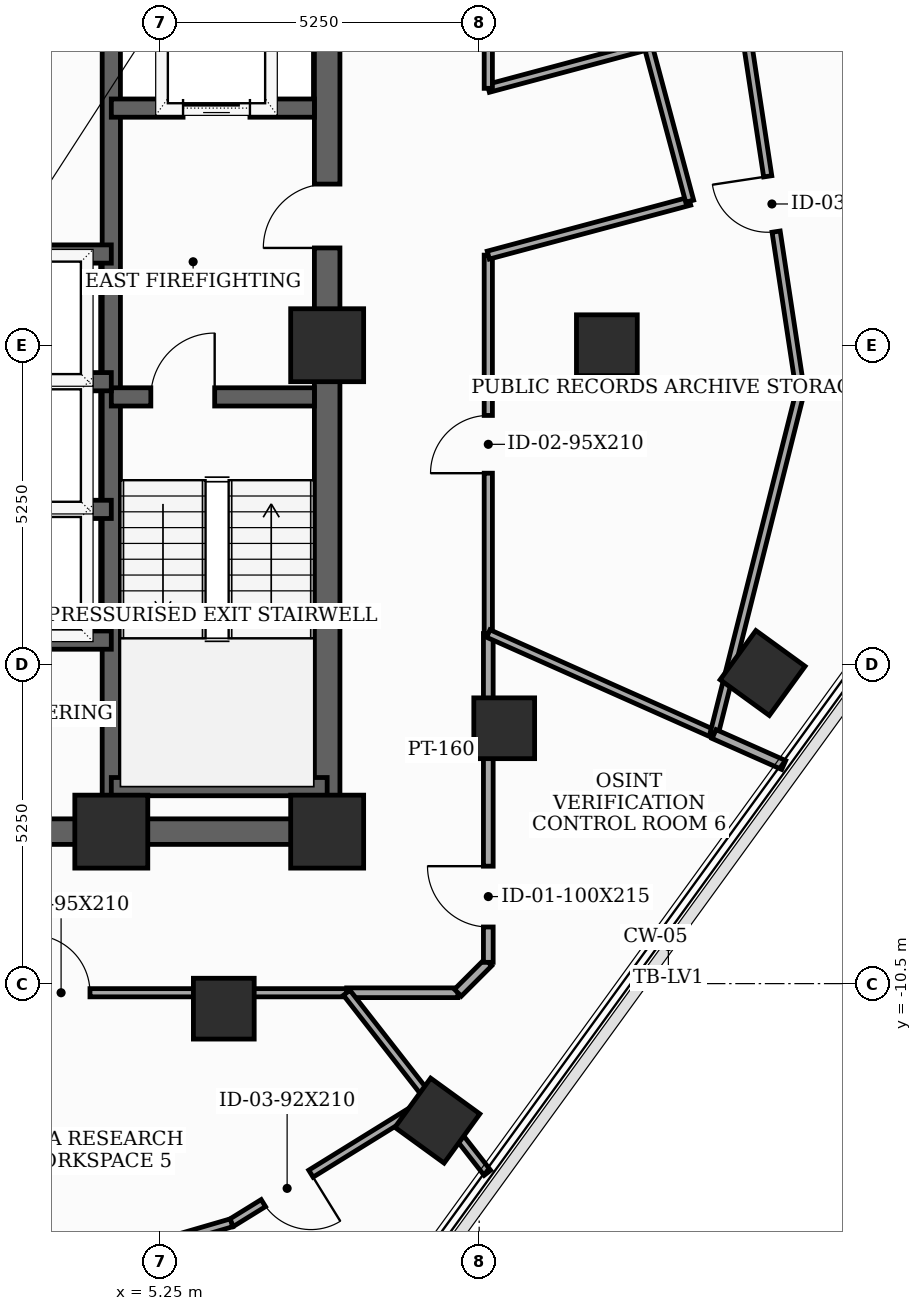
"""IFC4 building model, lengths in metres.
Left out: names, types, materials, properties, quantities, classifications, styles, units other than length and angle.
Written with IfcOpenShell. Run it as: python <this file> out.ifc"""

import sys

from ifc_helpers import new_model, si_unit, direction, frame, frame_2d, origin, origin_2d, place, context, subcontext, project, spatial, rectangle, extrude, element, fill, save


model = new_model("IFC4")
c1 = context("Model", 3, precision=1e-05, world=origin(), true_north=direction((0.0, 1.0)))
c2 = subcontext(c1, "Body", "Model", "MODEL_VIEW")
j1 = project(units=[si_unit("LENGTHUNIT", "METRE"), si_unit("PLANEANGLEUNIT", "RADIAN")], contexts=[c1])
p1 = place(None, origin())
s1 = spatial("IfcSite", under=j1, at=p1, CompositionType="ELEMENT")
p2 = place(p1, origin())
s2 = spatial("IfcBuilding", under=s1, at=p2, CompositionType="ELEMENT")
p3 = place(p2, frame((0.0, 0.0, 237.4)))
s3 = spatial("IfcBuildingStorey", under=s2, at=p3, CompositionType="ELEMENT", Elevation=237.4)
for number, where, z_axis, x_axis in (
    (1, (4.45, -8.0, 0.0), (0.0, 0.0, 1.0), (1.0, 0.0, 0.0)),
    (2, (8.0, -8.0, 0.0), (0.0, 0.0, 1.0), (1.0, 0.0, 0.0)),
    (3, (8.0, 0.0, 0.0), (0.0, 0.0, 1.0), (1.0, 0.0, 0.0)),
):
    element("IfcColumn", number, at=place(p3, frame(where, z_axis=z_axis, x_axis=x_axis)), inside=s3, PredefinedType="COLUMN", context=c2, shape_type="SweptSolid", body=[
        extrude(rectangle(XDim=1.2, YDim=1.2, at=origin_2d()), origin(), (0.0, 0.0, 1.0), 3.7),
    ])
for number, where, z_axis, x_axis in (
    (4, (12.6, 0.0, 0.0), (0.0, 0.0, 1.0), (1.0, 0.0, 0.0)),
    (5, (6.3, -10.912, 0.0), (0.0, 0.0, 1.0), (1.0, 0.0, 0.0)),
    (6, (10.912, -6.3, 0.0), (0.0, 0.0, 1.0), (1.0, 0.0, 0.0)),
    (7, (9.812, -12.753, 0.0), (0.0, 0.0, 1.0), (0.588, 0.809, 0.0)),
    (8, (15.161, -5.391, 0.0), (0.0, 0.0, 1.0), (0.588, 0.809, 0.0)),
):
    element("IfcColumn", number, at=place(p3, frame(where, z_axis=z_axis, x_axis=x_axis)), inside=s3, PredefinedType="COLUMN", context=c2, shape_type="SweptSolid", body=[
        extrude(rectangle(XDim=1.0, YDim=1.0, at=origin_2d()), origin(), (0.0, 0.0, 1.0), 3.7),
    ])
p4 = place(p3, frame((8.0, -8.0, 0.0), z_axis=(0.0, 0.0, 1.0), x_axis=(0.0, 1.0, 0.0)))
e9 = element("IfcWall", 9, at=p4, inside=s3, PredefinedType="SHEAR", context=c2, shape_type="SweptSolid", body=[
    extrude(rectangle(XDim=16.0, YDim=0.42, at=frame_2d((8.0, 0.0))), origin(), (0.0, 0.0, 1.0), 3.5),
])
p5 = place(p4, frame((9.6, 0.0, 0.0)))
e10 = element("IfcOpeningElement", 10, at=p5, cuts=e9, PredefinedType="OPENING", context=c2, shape_type="SweptSolid", body=[
    extrude(rectangle(XDim=1.05, YDim=2.15, at=frame_2d((0.525, 1.075))), frame((0.0, 0.22, 0.0), z_axis=(0.0, -1.0, 0.0), x_axis=(1.0, 0.0, 0.0)), (0.0, 0.0, 1.0), 0.44),
])
p6 = place(p4, frame((14.389, 0.0, 0.0)))
e11 = element("IfcOpeningElement", 11, at=p6, cuts=e9, PredefinedType="OPENING", context=c2, shape_type="SweptSolid", body=[
    extrude(rectangle(XDim=0.85, YDim=2.02, at=frame_2d((0.425, 1.01))), frame((0.0, 0.22, 0.0), z_axis=(0.0, -1.0, 0.0), x_axis=(1.0, 0.0, 0.0)), (0.0, 0.0, 1.0), 0.44),
])
p7 = place(p3, frame((-8.0, -8.0, 0.0), z_axis=(0.0, 0.0, 1.0), x_axis=(1.0, 0.0, 0.0)))
e12 = element("IfcWall", 12, at=p7, inside=s3, PredefinedType="SHEAR", context=c2, shape_type="SweptSolid", body=[
    extrude(rectangle(XDim=16.0, YDim=0.42, at=frame_2d((8.0, 0.0))), origin(), (0.0, 0.0, 1.0), 3.5),
])
p8 = place(p7, frame((4.6, 0.0, 0.0)))
e13 = element("IfcOpeningElement", 13, at=p8, cuts=e12, PredefinedType="OPENING", context=c2, shape_type="SweptSolid", body=[
    extrude(rectangle(XDim=0.95, YDim=2.1, at=frame_2d((0.475, 1.05))), frame((0.0, 0.22, 0.0), z_axis=(0.0, -1.0, 0.0), x_axis=(1.0, 0.0, 0.0)), (0.0, 0.0, 1.0), 0.44),
])
p9 = place(p7, frame((7.52, 0.0, 0.0)))
e14 = element("IfcOpeningElement", 14, at=p9, cuts=e12, PredefinedType="OPENING", context=c2, shape_type="SweptSolid", body=[
    extrude(rectangle(XDim=0.95, YDim=2.1, at=frame_2d((0.475, 1.05))), frame((0.0, 0.22, 0.0), z_axis=(0.0, -1.0, 0.0), x_axis=(1.0, 0.0, 0.0)), (0.0, 0.0, 1.0), 0.44),
])
p10 = place(p7, frame((10.45, 0.0, 0.0)))
e15 = element("IfcOpeningElement", 15, at=p10, cuts=e12, PredefinedType="OPENING", context=c2, shape_type="SweptSolid", body=[
    extrude(rectangle(XDim=0.95, YDim=2.1, at=frame_2d((0.475, 1.05))), frame((0.0, 0.22, 0.0), z_axis=(0.0, -1.0, 0.0), x_axis=(1.0, 0.0, 0.0)), (0.0, 0.0, 1.0), 0.44),
])
p11 = place(p3, frame((4.45, -7.79, 0.0), z_axis=(0.0, 0.0, 1.0), x_axis=(0.0, 1.0, 0.0)))
e16 = element("IfcWall", 16, at=p11, inside=s3, PredefinedType="SHEAR", context=c2, shape_type="SweptSolid", body=[
    extrude(rectangle(XDim=15.58, YDim=0.3, at=frame_2d((7.79, 0.0))), origin(), (0.0, 0.0, 1.0), 3.5),
])
p12 = place(p3, frame((4.45, -0.85, 0.0), z_axis=(0.0, 0.0, 1.0), x_axis=(1.0, 0.0, 0.0)))
e17 = element("IfcWall", 17, at=p12, inside=s3, PredefinedType="SHEAR", context=c2, shape_type="SweptSolid", body=[
    extrude(rectangle(XDim=3.34, YDim=0.3, at=frame_2d((1.67, 0.0))), origin(), (0.0, 0.0, 1.0), 3.5),
])
p13 = place(p12, frame((0.65, 0.0, 0.0)))
e18 = element("IfcOpeningElement", 18, at=p13, cuts=e17, PredefinedType="OPENING", context=c2, shape_type="SweptSolid", body=[
    extrude(rectangle(XDim=1.05, YDim=2.15, at=frame_2d((0.525, 1.075))), frame((0.0, 0.16, 0.0), z_axis=(0.0, -1.0, 0.0), x_axis=(1.0, 0.0, 0.0)), (0.0, 0.0, 1.0), 0.32),
])
p14 = place(p3, frame((4.45, -7.26, 0.0), z_axis=(0.0, 0.0, 1.0), x_axis=(1.0, 0.0, 0.0)))
e19 = element("IfcWall", 19, at=p14, inside=s3, PredefinedType="SHEAR", context=c2, shape_type="SweptSolid", body=[
    extrude(rectangle(XDim=3.55, YDim=0.3, at=frame_2d((1.775, 0.0))), origin(), (0.0, 0.0, 1.0), 3.5),
])
p15 = place(p3, frame((4.45, 3.9, 0.0), z_axis=(0.0, 0.0, 1.0), x_axis=(1.0, 0.0, 0.0)))
e20 = element("IfcWall", 20, at=p15, inside=s3, PredefinedType="SHEAR", context=c2, shape_type="SweptSolid", body=[
    extrude(rectangle(XDim=3.34, YDim=0.3, at=frame_2d((1.67, 0.0))), origin(), (0.0, 0.0, 1.0), 3.5),
])
p16 = place(p15, frame((1.18, 0.0, 0.0)))
e21 = element("IfcOpeningElement", 21, at=p16, cuts=e20, PredefinedType="OPENING", context=c2, shape_type="SweptSolid", body=[
    extrude(rectangle(XDim=1.1, YDim=2.1, at=frame_2d((0.55, 1.05))), frame((0.0, 0.16, 0.0), z_axis=(0.0, -1.0, 0.0), x_axis=(1.0, 0.0, 0.0)), (0.0, 0.0, 1.0), 0.32),
])
p17 = place(p3, frame((-4.45, -4.85, 0.0), z_axis=(0.0, 0.0, 1.0), x_axis=(1.0, 0.0, 0.0)))
e22 = element("IfcWall", 22, at=p17, inside=s3, PredefinedType="SHEAR", context=c2, shape_type="SweptSolid", body=[
    extrude(rectangle(XDim=8.9, YDim=0.3, at=frame_2d((4.45, 0.0))), origin(), (0.0, 0.0, 1.0), 3.5),
])
for number, where, z_axis, x_axis in (
    (23, (1.68, 1.5, 0.0), (0.0, 0.0, 1.0), (1.0, 0.0, 0.0)),
    (24, (1.68, -2.7, 0.0), (0.0, 0.0, 1.0), (1.0, 0.0, 0.0)),
    (25, (1.68, -0.6, 0.0), (0.0, 0.0, 1.0), (1.0, 0.0, 0.0)),
):
    element("IfcWall", number, at=place(p3, frame(where, z_axis=z_axis, x_axis=x_axis)), inside=s3, PredefinedType="SHEAR", context=c2, shape_type="SweptSolid", body=[
        extrude(rectangle(XDim=2.77, YDim=0.3, at=frame_2d((1.385, 0.0))), origin(), (0.0, 0.0, 1.0), 3.5),
    ])
p18 = place(p3, frame((10.65, -4.742, 0.0), z_axis=(0.0, 0.0, 1.0), x_axis=(0.0, 1.0, 0.0)))
e26 = element("IfcWall", 26, at=p18, inside=s3, PredefinedType="PARTITIONING", context=c2, shape_type="SweptSolid", body=[
    extrude(rectangle(XDim=6.224, YDim=0.135, at=frame_2d((3.112, 0.0))), origin(), (0.0, 0.0, 1.0), 2.885),
])
p19 = place(p18, frame((2.637, 0.0, 0.0)))
e27 = element("IfcOpeningElement", 27, at=p19, cuts=e26, PredefinedType="OPENING", context=c2, shape_type="SweptSolid", body=[
    extrude(rectangle(XDim=0.95, YDim=2.1, at=frame_2d((0.475, 1.05))), frame((0.0, 0.077, 0.0), z_axis=(0.0, -1.0, 0.0), x_axis=(1.0, 0.0, 0.0)), (0.0, 0.0, 1.0), 0.155),
])
p20 = place(p3, frame((10.65, 1.482, 0.0), z_axis=(0.0, 0.0, 1.0), x_axis=(0.965961397105, 0.2586862565, 0.0)))
e28 = element("IfcWall", 28, at=p20, inside=s3, PredefinedType="PARTITIONING", context=c2, shape_type="SweptSolid", body=[
    extrude(rectangle(XDim=3.429, YDim=0.135, at=frame_2d((1.714, 0.0))), origin(), (0.0, 0.0, 1.0), 2.885),
])
p21 = place(p3, frame((13.962, 2.369, 0.0), z_axis=(0.0, 0.0, 1.0), x_axis=(-0.258413725385, 0.966034340245, 0.0)))
e29 = element("IfcWall", 29, at=p21, inside=s3, PredefinedType="PARTITIONING", context=c2, shape_type="SweptSolid", body=[
    extrude(rectangle(XDim=2.65, YDim=0.135, at=frame_2d((1.325, 0.0))), origin(), (0.0, 0.0, 1.0), 3.5),
])
p22 = place(p3, frame((13.277, 4.929, 0.0), z_axis=(0.0, 0.0, 1.0), x_axis=(-0.965934830229, -0.258785439601, 0.0)))
e30 = element("IfcWall", 30, at=p22, inside=s3, PredefinedType="PARTITIONING", context=c2, shape_type="SweptSolid", body=[
    extrude(rectangle(XDim=2.72, YDim=0.135, at=frame_2d((1.36, 0.0))), origin(), (0.0, 0.0, 1.0), 2.885),
])
p23 = place(p3, frame((10.65, 4.225, 0.0), z_axis=(0.0, 0.0, 1.0), x_axis=(0.0, 1.0, 0.0)))
e31 = element("IfcWall", 31, at=p23, inside=s3, PredefinedType="PARTITIONING", context=c2, shape_type="SweptSolid", body=[
    extrude(rectangle(XDim=5.925, YDim=0.135, at=frame_2d((2.962, 0.0))), origin(), (0.0, 0.0, 1.0), 2.885),
])
p24 = place(p3, frame((2.45, -10.65, 0.0), z_axis=(0.0, 0.0, 1.0), x_axis=(1.0, 0.0, 0.0)))
e32 = element("IfcWall", 32, at=p24, inside=s3, PredefinedType="PARTITIONING", context=c2, shape_type="SweptSolid", body=[
    extrude(rectangle(XDim=5.871, YDim=0.135, at=frame_2d((2.936, 0.0))), origin(), (0.0, 0.0, 1.0), 2.885),
])
p25 = place(p24, frame((0.699, 0.0, 0.0)))
e33 = element("IfcOpeningElement", 33, at=p25, cuts=e32, PredefinedType="OPENING", context=c2, shape_type="SweptSolid", body=[
    extrude(rectangle(XDim=0.95, YDim=2.1, at=frame_2d((0.475, 1.05))), frame((0.0, 0.077, 0.0), z_axis=(0.0, -1.0, 0.0), x_axis=(1.0, 0.0, 0.0)), (0.0, 0.0, 1.0), 0.155),
])
p26 = place(p3, frame((8.321, -10.65, 0.0), z_axis=(0.0, 0.0, 1.0), x_axis=(1.0, 0.0, 0.0)))
e34 = element("IfcWall", 34, at=p26, inside=s3, PredefinedType="PARTITIONING", context=c2, shape_type="SweptSolid", body=[
    extrude(rectangle(XDim=1.829, YDim=0.16, at=frame_2d((0.915, 0.0))), origin(), (0.0, 0.0, 1.0), 3.5),
])
p27 = place(p3, frame((10.15, -10.65, 0.0), z_axis=(0.0, 0.0, 1.0), x_axis=(0.707106781187, 0.707106781187, 0.0)))
e35 = element("IfcWall", 35, at=p27, inside=s3, PredefinedType="PARTITIONING", context=c2, shape_type="SweptSolid", body=[
    extrude(rectangle(XDim=0.707, YDim=0.16, at=frame_2d((0.354, 0.0))), origin(), (0.0, 0.0, 1.0), 3.5),
])
p28 = place(p3, frame((10.65, -10.15, 0.0), z_axis=(0.0, 0.0, 1.0), x_axis=(0.0, 1.0, 0.0)))
e36 = element("IfcWall", 36, at=p28, inside=s3, PredefinedType="PARTITIONING", context=c2, shape_type="SweptSolid", body=[
    extrude(rectangle(XDim=5.408, YDim=0.16, at=frame_2d((2.704, 0.0))), origin(), (0.0, 0.0, 1.0), 2.885),
])
p29 = place(p28, frame((0.582, 0.0, 0.0)))
e37 = element("IfcOpeningElement", 37, at=p29, cuts=e36, PredefinedType="OPENING", context=c2, shape_type="SweptSolid", body=[
    extrude(rectangle(XDim=1.0, YDim=2.15, at=frame_2d((0.5, 1.075))), frame((0.0, 0.09, 0.0), z_axis=(0.0, -1.0, 0.0), x_axis=(1.0, 0.0, 0.0)), (0.0, 0.0, 1.0), 0.18),
])
p30 = place(p3, frame((10.65, -4.742, 0.0), z_axis=(0.0, 0.0, 1.0), x_axis=(0.913556239153, -0.406712426544, 0.0)))
e38 = element("IfcWall", 38, at=p30, inside=s3, PredefinedType="PARTITIONING", context=c2, shape_type="SweptSolid", body=[
    extrude(rectangle(XDim=4.064, YDim=0.135, at=frame_2d((2.032, 0.0))), origin(), (0.0, 0.0, 1.0), 2.885),
])
p31 = place(p3, frame((14.363, -6.395, 0.0), z_axis=(0.0, 0.0, 1.0), x_axis=(0.244106617879, 0.969748399899, 0.0)))
e39 = element("IfcWall", 39, at=p31, inside=s3, PredefinedType="PARTITIONING", context=c2, shape_type="SweptSolid", body=[
    extrude(rectangle(XDim=5.813, YDim=0.135, at=frame_2d((2.906, 0.0))), origin(), (0.0, 0.0, 1.0), 2.985),
])
p32 = place(p3, frame((15.782, -0.758, 0.0), z_axis=(0.0, 0.0, 1.0), x_axis=(-0.150025845784, 0.988682075086, 0.0)))
e40 = element("IfcWall", 40, at=p32, inside=s3, PredefinedType="PARTITIONING", context=c2, shape_type="SweptSolid", body=[
    extrude(rectangle(XDim=6.233, YDim=0.135, at=frame_2d((3.116, 0.0))), origin(), (0.0, 0.0, 1.0), 2.985),
])
p33 = place(p32, frame((2.656, 0.0, 0.0)))
e41 = element("IfcOpeningElement", 41, at=p33, cuts=e40, PredefinedType="OPENING", context=c2, shape_type="SweptSolid", body=[
    extrude(rectangle(XDim=0.92, YDim=2.1, at=frame_2d((0.46, 1.05))), frame((0.0, 0.077, 0.0), z_axis=(0.0, -1.0, 0.0), x_axis=(1.0, 0.0, 0.0)), (0.0, 0.0, 1.0), 0.155),
])
p34 = place(p3, frame((9.696, -12.411, 0.0), z_axis=(0.0, 0.0, 1.0), x_axis=(-0.850393663863, -0.526146953295, 0.0)))
e42 = element("IfcWall", 42, at=p34, inside=s3, PredefinedType="PARTITIONING", context=c2, shape_type="SweptSolid", body=[
    extrude(rectangle(XDim=3.845, YDim=0.135, at=frame_2d((1.923, 0.0))), origin(), (0.0, 0.0, 1.0), 2.985),
])
p35 = place(p34, frame((2.309, 0.0, 0.0)))
e43 = element("IfcOpeningElement", 43, at=p35, cuts=e42, PredefinedType="OPENING", context=c2, shape_type="SweptSolid", body=[
    extrude(rectangle(XDim=0.92, YDim=2.1, at=frame_2d((0.46, 1.05))), frame((0.0, 0.077, 0.0), z_axis=(0.0, -1.0, 0.0), x_axis=(1.0, 0.0, 0.0)), (0.0, 0.0, 1.0), 0.155),
])
p36 = place(p3, frame((6.426, -14.434, 0.0), z_axis=(0.0, 0.0, 1.0), x_axis=(-0.960041241254, -0.279858562654, 0.0)))
e44 = element("IfcWall", 44, at=p36, inside=s3, PredefinedType="PARTITIONING", context=c2, shape_type="SweptSolid", body=[
    extrude(rectangle(XDim=3.844, YDim=0.135, at=frame_2d((1.922, 0.0))), origin(), (0.0, 0.0, 1.0), 3.5),
])
p37 = place(p3, frame((10.635, -13.612, 0.0), z_axis=(0.0, 0.0, 1.0), x_axis=(-0.615768345532, 0.787927245779, 0.0)))
e45 = element("IfcWall", 45, at=p37, inside=s3, PredefinedType="PARTITIONING", context=c2, shape_type="SweptSolid", body=[
    extrude(rectangle(XDim=1.524, YDim=0.135, at=frame_2d((0.762, 0.0))), origin(), (0.0, 0.0, 1.0), 2.985),
])
p38 = place(p3, frame((9.696, -12.411, 0.0), z_axis=(0.0, 0.0, 1.0), x_axis=(-0.615429845305, 0.788191668002, 0.0)))
e46 = element("IfcWall", 46, at=p38, inside=s3, PredefinedType="PARTITIONING", context=c2, shape_type="SweptSolid", body=[
    extrude(rectangle(XDim=2.234, YDim=0.135, at=frame_2d((1.117, 0.0))), origin(), (0.0, 0.0, 1.0), 2.985),
])
p39 = place(p3, frame((15.508, -6.905, 0.0), z_axis=(0.0, 0.0, 1.0), x_axis=(-0.913626692327, 0.406554137929, 0.0)))
e47 = element("IfcWall", 47, at=p39, inside=s3, PredefinedType="PARTITIONING", context=c2, shape_type="SweptSolid", body=[
    extrude(rectangle(XDim=1.253, YDim=0.16, at=frame_2d((0.626, 0.0))), origin(), (0.0, 0.0, 1.0), 3.035),
])
p40 = place(p5, origin())
e48 = element("IfcDoor", 48, at=p40, inside=s3, OperationType="SINGLE_SWING_LEFT", PredefinedType="DOOR", context=c2, shape_type="SweptSolid", body=[
    extrude(rectangle(XDim=1.05, YDim=2.15, at=frame_2d((0.525, 1.075))), frame((0.0, 0.025, 0.0), z_axis=(0.0, -1.0, 0.0), x_axis=(1.0, 0.0, 0.0)), (0.0, 0.0, 1.0), 0.05),
])
fill(e10, e48)
p41 = place(p13, origin())
e49 = element("IfcDoor", 49, at=p41, inside=s3, OperationType="SINGLE_SWING_RIGHT", PredefinedType="DOOR", context=c2, shape_type="SweptSolid", body=[
    extrude(rectangle(XDim=1.05, YDim=2.15, at=frame_2d((0.525, 1.075))), frame((0.0, 0.025, 0.0), z_axis=(0.0, -1.0, 0.0), x_axis=(1.0, 0.0, 0.0)), (0.0, 0.0, 1.0), 0.05),
])
fill(e18, e49)
p42 = place(p16, origin())
e50 = element("IfcDoor", 50, at=p42, inside=s3, OperationType="SLIDING_TO_LEFT", PredefinedType="DOOR", context=c2, shape_type="SweptSolid", body=[
    extrude(rectangle(XDim=1.1, YDim=2.1, at=frame_2d((0.55, 1.05))), frame((0.0, 0.025, 0.0), z_axis=(0.0, -1.0, 0.0), x_axis=(1.0, 0.0, 0.0)), (0.0, 0.0, 1.0), 0.05),
])
fill(e21, e50)
p43 = place(p19, origin())
e51 = element("IfcDoor", 51, at=p43, inside=s3, OperationType="SINGLE_SWING_LEFT", PredefinedType="DOOR", context=c2, shape_type="SweptSolid", body=[
    extrude(rectangle(XDim=0.95, YDim=2.1, at=frame_2d((0.475, 1.05))), frame((0.0, 0.025, 0.0), z_axis=(0.0, -1.0, 0.0), x_axis=(1.0, 0.0, 0.0)), (0.0, 0.0, 1.0), 0.05),
])
fill(e27, e51)
p44 = place(p25, origin())
e52 = element("IfcDoor", 52, at=p44, inside=s3, OperationType="SINGLE_SWING_LEFT", PredefinedType="DOOR", context=c2, shape_type="SweptSolid", body=[
    extrude(rectangle(XDim=0.95, YDim=2.1, at=frame_2d((0.475, 1.05))), frame((0.0, 0.025, 0.0), z_axis=(0.0, -1.0, 0.0), x_axis=(1.0, 0.0, 0.0)), (0.0, 0.0, 1.0), 0.05),
])
fill(e33, e52)
p45 = place(p29, origin())
e53 = element("IfcDoor", 53, at=p45, inside=s3, OperationType="SINGLE_SWING_RIGHT", PredefinedType="DOOR", context=c2, shape_type="SweptSolid", body=[
    extrude(rectangle(XDim=1.0, YDim=2.15, at=frame_2d((0.5, 1.075))), frame((0.0, 0.025, 0.0), z_axis=(0.0, -1.0, 0.0), x_axis=(1.0, 0.0, 0.0)), (0.0, 0.0, 1.0), 0.05),
])
fill(e37, e53)
p46 = place(p33, origin())
e54 = element("IfcDoor", 54, at=p46, inside=s3, OperationType="SINGLE_SWING_RIGHT", PredefinedType="DOOR", context=c2, shape_type="SweptSolid", body=[
    extrude(rectangle(XDim=0.92, YDim=2.1, at=frame_2d((0.46, 1.05))), frame((0.0, 0.025, 0.0), z_axis=(0.0, -1.0, 0.0), x_axis=(1.0, 0.0, 0.0)), (0.0, 0.0, 1.0), 0.05),
])
fill(e41, e54)
p47 = place(p35, origin())
e55 = element("IfcDoor", 55, at=p47, inside=s3, OperationType="SINGLE_SWING_LEFT", PredefinedType="DOOR", context=c2, shape_type="SweptSolid", body=[
    extrude(rectangle(XDim=0.92, YDim=2.1, at=frame_2d((0.46, 1.05))), frame((0.0, 0.025, 0.0), z_axis=(0.0, -1.0, 0.0), x_axis=(1.0, 0.0, 0.0)), (0.0, 0.0, 1.0), 0.05),
])
fill(e43, e55)
save(model, sys.argv[1])
